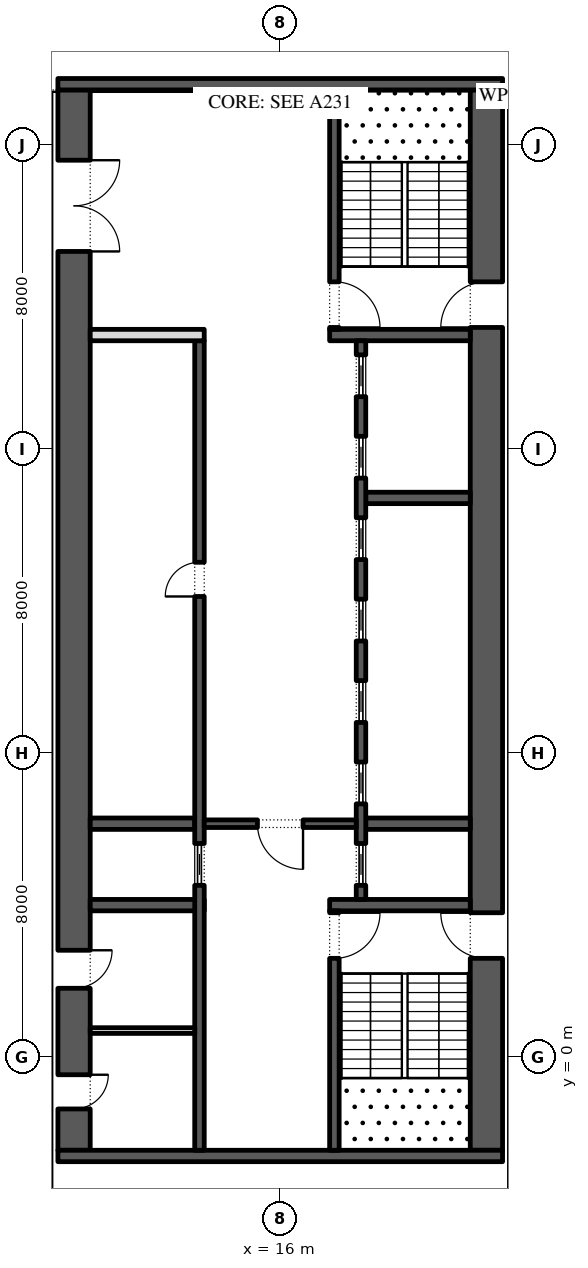
"""IFC4 building model, lengths in metres.
Left out: names, types, materials, properties, quantities, classifications, styles, units other than length and angle.
Written with IfcOpenShell. Run it as: python <this file> out.ifc"""

import sys

from ifc_helpers import new_model, si_unit, direction, frame, frame_2d, origin, place, context, subcontext, project, spatial, rectangle, extrude, element, fill, save


model = new_model("IFC4")
c1 = context("Model", 3, precision=1e-05, world=origin(), true_north=direction((0.0, 1.0)))
c2 = subcontext(c1, "Body", "Model", "MODEL_VIEW")
j1 = project(units=[si_unit("LENGTHUNIT", "METRE"), si_unit("PLANEANGLEUNIT", "RADIAN")], contexts=[c1])
p1 = place(None, origin())
s1 = spatial("IfcSite", under=j1, at=p1, CompositionType="ELEMENT")
p2 = place(p1, origin())
s2 = spatial("IfcBuilding", under=s1, at=p2, CompositionType="ELEMENT")
p3 = place(p2, frame((0.0, 0.0, 130.8)))
s3 = spatial("IfcBuildingStorey", under=s2, at=p3, CompositionType="ELEMENT", Elevation=130.8)
p4 = place(p3, frame((21.425, -2.45, 0.0), z_axis=(0.0, 0.0, 1.0), x_axis=(0.0, 1.0, 0.0)))
e1 = element("IfcWall", 1, at=p4, inside=s3, PredefinedType="SHEAR", context=c2, shape_type="SweptSolid", body=[
    extrude(rectangle(XDim=27.9, YDim=0.85, at=frame_2d((13.95, 0.0))), origin(), (0.0, 0.0, 1.0), 4.0),
])
p5 = place(p4, frame((5.05, 0.0, 0.0)))
e2 = element("IfcOpeningElement", 2, at=p5, cuts=e1, PredefinedType="OPENING", context=c2, shape_type="SweptSolid", body=[
    extrude(rectangle(XDim=1.2, YDim=2.1, at=frame_2d((0.6, 1.05))), frame((0.0, 0.435, 0.0), z_axis=(0.0, -1.0, 0.0), x_axis=(1.0, 0.0, 0.0)), (0.0, 0.0, 1.0), 0.87),
])
p6 = place(p4, frame((21.65, 0.0, 0.0)))
e3 = element("IfcOpeningElement", 3, at=p6, cuts=e1, PredefinedType="OPENING", context=c2, shape_type="SweptSolid", body=[
    extrude(rectangle(XDim=1.2, YDim=2.1, at=frame_2d((0.6, 1.05))), frame((0.0, 0.435, 0.0), z_axis=(0.0, -1.0, 0.0), x_axis=(1.0, 0.0, 0.0)), (0.0, 0.0, 1.0), 0.87),
])
p7 = place(p3, frame((10.575, -2.45, 0.0), z_axis=(0.0, 0.0, 1.0), x_axis=(0.0, 1.0, 0.0)))
e4 = element("IfcWall", 4, at=p7, inside=s3, PredefinedType="SHEAR", context=c2, shape_type="SweptSolid", body=[
    extrude(rectangle(XDim=27.9, YDim=0.85, at=frame_2d((13.95, 0.0))), origin(), (0.0, 0.0, 1.0), 4.0),
])
p8 = place(p7, frame((23.65, 0.0, 0.0)))
e5 = element("IfcOpeningElement", 5, at=p8, cuts=e4, PredefinedType="OPENING", context=c2, shape_type="SweptSolid", body=[
    extrude(rectangle(XDim=2.4, YDim=2.1, at=frame_2d((1.2, 1.05))), frame((0.0, 0.435, 0.0), z_axis=(0.0, -1.0, 0.0), x_axis=(1.0, 0.0, 0.0)), (0.0, 0.0, 1.0), 0.87),
])
p9 = place(p7, frame((1.087, 0.0, 0.0)))
e6 = element("IfcOpeningElement", 6, at=p9, cuts=e4, PredefinedType="OPENING", context=c2, shape_type="SweptSolid", body=[
    extrude(rectangle(XDim=0.9, YDim=2.1, at=frame_2d((0.45, 1.05))), frame((0.0, 0.435, 0.0), z_axis=(0.0, -1.0, 0.0), x_axis=(1.0, 0.0, 0.0)), (0.0, 0.0, 1.0), 0.87),
])
p10 = place(p7, frame((4.262, 0.0, 0.0)))
e7 = element("IfcOpeningElement", 7, at=p10, cuts=e4, PredefinedType="OPENING", context=c2, shape_type="SweptSolid", body=[
    extrude(rectangle(XDim=1.0, YDim=2.1, at=frame_2d((0.5, 1.05))), frame((0.0, 0.435, 0.0), z_axis=(0.0, -1.0, 0.0), x_axis=(1.0, 0.0, 0.0)), (0.0, 0.0, 1.0), 0.87),
])
for number, where, z_axis, x_axis in (
    (8, (10.15, -2.6, 0.0), (0.0, 0.0, 1.0), (1.0, 0.0, 0.0)),
    (9, (10.15, 25.6, 0.0), (0.0, 0.0, 1.0), (1.0, 0.0, 0.0)),
):
    element("IfcWall", number, at=place(p3, frame(where, z_axis=z_axis, x_axis=x_axis)), inside=s3, PredefinedType="SHEAR", context=c2, shape_type="SweptSolid", body=[
        extrude(rectangle(XDim=11.7, YDim=0.3, at=frame_2d((5.85, 0.0))), origin(), (0.0, 0.0, 1.0), 4.0),
    ])
p11 = place(p3, frame((17.3, 4.0, 0.0), z_axis=(0.0, 0.0, 1.0), x_axis=(1.0, 0.0, 0.0)))
e10 = element("IfcWall", 10, at=p11, inside=s3, PredefinedType="SHEAR", context=c2, shape_type="SweptSolid", body=[
    extrude(rectangle(XDim=3.7, YDim=0.3, at=frame_2d((1.85, 0.0))), origin(), (0.0, 0.0, 1.0), 4.0),
])
p12 = place(p3, frame((17.425, -2.45, 0.0), z_axis=(0.0, 0.0, 1.0), x_axis=(0.0, 1.0, 0.0)))
e11 = element("IfcWall", 11, at=p12, inside=s3, PredefinedType="SHEAR", context=c2, shape_type="SweptSolid", body=[
    extrude(rectangle(XDim=6.3, YDim=0.25, at=frame_2d((3.15, 0.0))), origin(), (0.0, 0.0, 1.0), 4.0),
])
p13 = place(p12, frame((5.05, 0.0, 0.0)))
e12 = element("IfcOpeningElement", 12, at=p13, cuts=e11, PredefinedType="OPENING", context=c2, shape_type="SweptSolid", body=[
    extrude(rectangle(XDim=1.2, YDim=2.1, at=frame_2d((0.6, 1.05))), frame((0.0, 0.135, 0.0), z_axis=(0.0, -1.0, 0.0), x_axis=(1.0, 0.0, 0.0)), (0.0, 0.0, 1.0), 0.27),
])
p14 = place(p3, frame((17.3, 19.0, 0.0), z_axis=(0.0, 0.0, 1.0), x_axis=(1.0, 0.0, 0.0)))
e13 = element("IfcWall", 13, at=p14, inside=s3, PredefinedType="SHEAR", context=c2, shape_type="SweptSolid", body=[
    extrude(rectangle(XDim=3.7, YDim=0.3, at=frame_2d((1.85, 0.0))), origin(), (0.0, 0.0, 1.0), 4.0),
])
p15 = place(p3, frame((17.425, 19.15, 0.0), z_axis=(0.0, 0.0, 1.0), x_axis=(0.0, 1.0, 0.0)))
e14 = element("IfcWall", 14, at=p15, inside=s3, PredefinedType="SHEAR", context=c2, shape_type="SweptSolid", body=[
    extrude(rectangle(XDim=6.3, YDim=0.25, at=frame_2d((3.15, 0.0))), origin(), (0.0, 0.0, 1.0), 4.0),
])
p16 = place(p15, frame((0.05, 0.0, 0.0)))
e15 = element("IfcOpeningElement", 15, at=p16, cuts=e14, PredefinedType="OPENING", context=c2, shape_type="SweptSolid", body=[
    extrude(rectangle(XDim=1.2, YDim=2.1, at=frame_2d((0.6, 1.05))), frame((0.0, 0.135, 0.0), z_axis=(0.0, -1.0, 0.0), x_axis=(1.0, 0.0, 0.0)), (0.0, 0.0, 1.0), 0.27),
])
for number, where, z_axis, x_axis in (
    (16, (18.25, 6.143, 0.0), (0.0, 0.0, 1.0), (1.0, 0.0, 0.0)),
    (17, (18.25, 14.714, 0.0), (0.0, 0.0, 1.0), (1.0, 0.0, 0.0)),
):
    element("IfcWall", number, at=place(p3, frame(where, z_axis=z_axis, x_axis=x_axis)), inside=s3, PredefinedType="SHEAR", context=c2, shape_type="SweptSolid", body=[
        extrude(rectangle(XDim=2.75, YDim=0.3, at=frame_2d((1.375, 0.0))), origin(), (0.0, 0.0, 1.0), 4.0),
    ])
p17 = place(p3, frame((18.125, 4.15, 0.0), z_axis=(0.0, 0.0, 1.0), x_axis=(0.0, 1.0, 0.0)))
e18 = element("IfcWall", 18, at=p17, inside=s3, PredefinedType="SHEAR", context=c2, shape_type="SweptSolid", body=[
    extrude(rectangle(XDim=14.7, YDim=0.25, at=frame_2d((7.35, 0.0))), origin(), (0.0, 0.0, 1.0), 4.0),
])
p18 = place(p17, frame((0.371, 0.0, 0.0)))
e19 = element("IfcOpeningElement", 19, at=p18, cuts=e18, PredefinedType="OPENING", context=c2, shape_type="SweptSolid", body=[
    extrude(rectangle(XDim=1.1, YDim=2.1, at=frame_2d((0.55, 1.05))), frame((0.0, 0.135, 0.0), z_axis=(0.0, -1.0, 0.0), x_axis=(1.0, 0.0, 0.0)), (0.0, 0.0, 1.0), 0.27),
])
p19 = place(p17, frame((2.514, 0.0, 0.0)))
e20 = element("IfcOpeningElement", 20, at=p19, cuts=e18, PredefinedType="OPENING", context=c2, shape_type="SweptSolid", body=[
    extrude(rectangle(XDim=1.1, YDim=2.1, at=frame_2d((0.55, 1.05))), frame((0.0, 0.135, 0.0), z_axis=(0.0, -1.0, 0.0), x_axis=(1.0, 0.0, 0.0)), (0.0, 0.0, 1.0), 0.27),
])
p20 = place(p17, frame((4.657, 0.0, 0.0)))
e21 = element("IfcOpeningElement", 21, at=p20, cuts=e18, PredefinedType="OPENING", context=c2, shape_type="SweptSolid", body=[
    extrude(rectangle(XDim=1.1, YDim=2.1, at=frame_2d((0.55, 1.05))), frame((0.0, 0.135, 0.0), z_axis=(0.0, -1.0, 0.0), x_axis=(1.0, 0.0, 0.0)), (0.0, 0.0, 1.0), 0.27),
])
p21 = place(p17, frame((6.8, 0.0, 0.0)))
e22 = element("IfcOpeningElement", 22, at=p21, cuts=e18, PredefinedType="OPENING", context=c2, shape_type="SweptSolid", body=[
    extrude(rectangle(XDim=1.1, YDim=2.1, at=frame_2d((0.55, 1.05))), frame((0.0, 0.135, 0.0), z_axis=(0.0, -1.0, 0.0), x_axis=(1.0, 0.0, 0.0)), (0.0, 0.0, 1.0), 0.27),
])
p22 = place(p17, frame((8.943, 0.0, 0.0)))
e23 = element("IfcOpeningElement", 23, at=p22, cuts=e18, PredefinedType="OPENING", context=c2, shape_type="SweptSolid", body=[
    extrude(rectangle(XDim=1.1, YDim=2.1, at=frame_2d((0.55, 1.05))), frame((0.0, 0.135, 0.0), z_axis=(0.0, -1.0, 0.0), x_axis=(1.0, 0.0, 0.0)), (0.0, 0.0, 1.0), 0.27),
])
p23 = place(p17, frame((11.086, 0.0, 0.0)))
e24 = element("IfcOpeningElement", 24, at=p23, cuts=e18, PredefinedType="OPENING", context=c2, shape_type="SweptSolid", body=[
    extrude(rectangle(XDim=1.1, YDim=2.1, at=frame_2d((0.55, 1.05))), frame((0.0, 0.135, 0.0), z_axis=(0.0, -1.0, 0.0), x_axis=(1.0, 0.0, 0.0)), (0.0, 0.0, 1.0), 0.27),
])
p24 = place(p17, frame((13.229, 0.0, 0.0)))
e25 = element("IfcOpeningElement", 25, at=p24, cuts=e18, PredefinedType="OPENING", context=c2, shape_type="SweptSolid", body=[
    extrude(rectangle(XDim=1.1, YDim=2.1, at=frame_2d((0.55, 1.05))), frame((0.0, 0.135, 0.0), z_axis=(0.0, -1.0, 0.0), x_axis=(1.0, 0.0, 0.0)), (0.0, 0.0, 1.0), 0.27),
])
p25 = place(p3, frame((11.0, 4.0, 0.0), z_axis=(0.0, 0.0, 1.0), x_axis=(1.0, 0.0, 0.0)))
e26 = element("IfcWall", 26, at=p25, inside=s3, PredefinedType="SHEAR", context=c2, shape_type="SweptSolid", body=[
    extrude(rectangle(XDim=3.0, YDim=0.3, at=frame_2d((1.5, 0.0))), origin(), (0.0, 0.0, 1.0), 4.0),
])
p26 = place(p3, frame((11.0, 6.143, 0.0), z_axis=(0.0, 0.0, 1.0), x_axis=(1.0, 0.0, 0.0)))
e27 = element("IfcWall", 27, at=p26, inside=s3, PredefinedType="SHEAR", context=c2, shape_type="SweptSolid", body=[
    extrude(rectangle(XDim=2.75, YDim=0.3, at=frame_2d((1.375, 0.0))), origin(), (0.0, 0.0, 1.0), 4.0),
])
p27 = place(p3, frame((13.875, -2.45, 0.0), z_axis=(0.0, 0.0, 1.0), x_axis=(0.0, 1.0, 0.0)))
e28 = element("IfcWall", 28, at=p27, inside=s3, PredefinedType="SHEAR", context=c2, shape_type="SweptSolid", body=[
    extrude(rectangle(XDim=21.3, YDim=0.25, at=frame_2d((10.65, 0.0))), origin(), (0.0, 0.0, 1.0), 4.0),
])
p28 = place(p27, frame((14.571, 0.0, 0.0)))
e29 = element("IfcOpeningElement", 29, at=p28, cuts=e28, PredefinedType="OPENING", context=c2, shape_type="SweptSolid", body=[
    extrude(rectangle(XDim=0.9, YDim=2.1, at=frame_2d((0.45, 1.05))), frame((0.0, 0.135, 0.0), z_axis=(0.0, -1.0, 0.0), x_axis=(1.0, 0.0, 0.0)), (0.0, 0.0, 1.0), 0.27),
])
p29 = place(p27, frame((6.971, 0.0, 0.0)))
e30 = element("IfcOpeningElement", 30, at=p29, cuts=e28, PredefinedType="OPENING", context=c2, shape_type="SweptSolid", body=[
    extrude(rectangle(XDim=1.1, YDim=2.1, at=frame_2d((0.55, 1.05))), frame((0.0, 0.135, 0.0), z_axis=(0.0, -1.0, 0.0), x_axis=(1.0, 0.0, 0.0)), (0.0, 0.0, 1.0), 0.27),
])
p30 = place(p3, frame((11.0, 19.0, 0.0), z_axis=(0.0, 0.0, 1.0), x_axis=(1.0, 0.0, 0.0)))
e31 = element("IfcWall", 31, at=p30, inside=s3, PredefinedType="PARTITIONING", context=c2, shape_type="SweptSolid", body=[
    extrude(rectangle(XDim=3.0, YDim=0.3, at=frame_2d((1.5, 0.0))), origin(), (0.0, 0.0, 1.0), 4.0),
])
p31 = place(p3, frame((14.0, 6.143, 0.0), z_axis=(0.0, 0.0, 1.0), x_axis=(1.0, 0.0, 0.0)))
e32 = element("IfcWall", 32, at=p31, inside=s3, PredefinedType="SHEAR", context=c2, shape_type="SweptSolid", body=[
    extrude(rectangle(XDim=4.0, YDim=0.2, at=frame_2d((2.0, 0.0))), origin(), (0.0, 0.0, 1.0), 4.0),
])
p32 = place(p31, frame((1.4, 0.0, 0.0)))
e33 = element("IfcOpeningElement", 33, at=p32, cuts=e32, PredefinedType="OPENING", context=c2, shape_type="SweptSolid", body=[
    extrude(rectangle(XDim=1.2, YDim=2.1, at=frame_2d((0.6, 1.05))), frame((0.0, 0.11, 0.0), z_axis=(0.0, -1.0, 0.0), x_axis=(1.0, 0.0, 0.0)), (0.0, 0.0, 1.0), 0.22),
])
p33 = place(p3, frame((11.0, 0.7, 0.0), z_axis=(0.0, 0.0, 1.0), x_axis=(1.0, 0.0, 0.0)))
e34 = element("IfcWall", 34, at=p33, inside=s3, PredefinedType="PARTITIONING", context=c2, shape_type="SweptSolid", body=[
    extrude(rectangle(XDim=2.75, YDim=0.15, at=frame_2d((1.375, 0.0))), origin(), (0.0, 0.0, 1.0), 4.0),
])
p34 = place(p18, origin())
e35 = element("IfcDoor", 35, at=p34, inside=s3, OperationType="SLIDING_TO_LEFT", PredefinedType="DOOR", context=c2, shape_type="SweptSolid", body=[
    extrude(rectangle(XDim=1.1, YDim=2.1, at=frame_2d((0.55, 1.05))), frame((0.0, 0.025, 0.0), z_axis=(0.0, -1.0, 0.0), x_axis=(1.0, 0.0, 0.0)), (0.0, 0.0, 1.0), 0.05),
])
fill(e19, e35)
p35 = place(p19, origin())
e36 = element("IfcDoor", 36, at=p35, inside=s3, OperationType="SLIDING_TO_LEFT", PredefinedType="DOOR", context=c2, shape_type="SweptSolid", body=[
    extrude(rectangle(XDim=1.1, YDim=2.1, at=frame_2d((0.55, 1.05))), frame((0.0, 0.025, 0.0), z_axis=(0.0, -1.0, 0.0), x_axis=(1.0, 0.0, 0.0)), (0.0, 0.0, 1.0), 0.05),
])
fill(e20, e36)
p36 = place(p20, origin())
e37 = element("IfcDoor", 37, at=p36, inside=s3, OperationType="SLIDING_TO_LEFT", PredefinedType="DOOR", context=c2, shape_type="SweptSolid", body=[
    extrude(rectangle(XDim=1.1, YDim=2.1, at=frame_2d((0.55, 1.05))), frame((0.0, 0.025, 0.0), z_axis=(0.0, -1.0, 0.0), x_axis=(1.0, 0.0, 0.0)), (0.0, 0.0, 1.0), 0.05),
])
fill(e21, e37)
p37 = place(p21, origin())
e38 = element("IfcDoor", 38, at=p37, inside=s3, OperationType="SLIDING_TO_LEFT", PredefinedType="DOOR", context=c2, shape_type="SweptSolid", body=[
    extrude(rectangle(XDim=1.1, YDim=2.1, at=frame_2d((0.55, 1.05))), frame((0.0, 0.025, 0.0), z_axis=(0.0, -1.0, 0.0), x_axis=(1.0, 0.0, 0.0)), (0.0, 0.0, 1.0), 0.05),
])
fill(e22, e38)
p38 = place(p22, origin())
e39 = element("IfcDoor", 39, at=p38, inside=s3, OperationType="SLIDING_TO_LEFT", PredefinedType="DOOR", context=c2, shape_type="SweptSolid", body=[
    extrude(rectangle(XDim=1.1, YDim=2.1, at=frame_2d((0.55, 1.05))), frame((0.0, 0.025, 0.0), z_axis=(0.0, -1.0, 0.0), x_axis=(1.0, 0.0, 0.0)), (0.0, 0.0, 1.0), 0.05),
])
fill(e23, e39)
p39 = place(p23, origin())
e40 = element("IfcDoor", 40, at=p39, inside=s3, OperationType="SLIDING_TO_LEFT", PredefinedType="DOOR", context=c2, shape_type="SweptSolid", body=[
    extrude(rectangle(XDim=1.1, YDim=2.1, at=frame_2d((0.55, 1.05))), frame((0.0, 0.025, 0.0), z_axis=(0.0, -1.0, 0.0), x_axis=(1.0, 0.0, 0.0)), (0.0, 0.0, 1.0), 0.05),
])
fill(e24, e40)
p40 = place(p24, origin())
e41 = element("IfcDoor", 41, at=p40, inside=s3, OperationType="SLIDING_TO_LEFT", PredefinedType="DOOR", context=c2, shape_type="SweptSolid", body=[
    extrude(rectangle(XDim=1.1, YDim=2.1, at=frame_2d((0.55, 1.05))), frame((0.0, 0.025, 0.0), z_axis=(0.0, -1.0, 0.0), x_axis=(1.0, 0.0, 0.0)), (0.0, 0.0, 1.0), 0.05),
])
fill(e25, e41)
p41 = place(p28, origin())
e42 = element("IfcDoor", 42, at=p41, inside=s3, OperationType="SINGLE_SWING_RIGHT", PredefinedType="DOOR", context=c2, shape_type="SweptSolid", body=[
    extrude(rectangle(XDim=0.9, YDim=2.1, at=frame_2d((0.45, 1.05))), frame((0.0, 0.125, 0.0), z_axis=(0.0, -1.0, 0.0), x_axis=(1.0, 0.0, 0.0)), (0.0, 0.0, 1.0), 0.05),
])
fill(e29, e42)
p42 = place(p29, origin())
e43 = element("IfcDoor", 43, at=p42, inside=s3, OperationType="SLIDING_TO_LEFT", PredefinedType="DOOR", context=c2, shape_type="SweptSolid", body=[
    extrude(rectangle(XDim=1.1, YDim=2.1, at=frame_2d((0.55, 1.05))), frame((0.0, 0.025, 0.0), z_axis=(0.0, -1.0, 0.0), x_axis=(1.0, 0.0, 0.0)), (0.0, 0.0, 1.0), 0.05),
])
fill(e30, e43)
p43 = place(p32, frame((1.2, 0.0, 0.0), z_axis=(0.0, 0.0, 1.0), x_axis=(-1.0, 0.0, 0.0)))
e44 = element("IfcDoor", 44, at=p43, inside=s3, OperationType="SINGLE_SWING_RIGHT", PredefinedType="DOOR", context=c2, shape_type="SweptSolid", body=[
    extrude(rectangle(XDim=1.2, YDim=2.1, at=frame_2d((0.6, 1.05))), frame((0.0, 0.025, 0.0), z_axis=(0.0, -1.0, 0.0), x_axis=(1.0, 0.0, 0.0)), (0.0, 0.0, 1.0), 0.05),
])
fill(e33, e44)
p44 = place(p8, frame((2.4, 0.0, 0.0), z_axis=(0.0, 0.0, 1.0), x_axis=(-1.0, 0.0, 0.0)))
e45 = element("IfcDoor", 45, at=p44, inside=s3, OperationType="DOUBLE_DOOR_SINGLE_SWING", PredefinedType="DOOR", context=c2, shape_type="SweptSolid", body=[
    extrude(rectangle(XDim=2.4, YDim=2.1, at=frame_2d((1.2, 1.05))), frame((0.0, 0.025, 0.0), z_axis=(0.0, -1.0, 0.0), x_axis=(1.0, 0.0, 0.0)), (0.0, 0.0, 1.0), 0.05),
])
fill(e5, e45)
p45 = place(p13, frame((1.2, 0.0, 0.0), z_axis=(0.0, 0.0, 1.0), x_axis=(-1.0, 0.0, 0.0)))
e46 = element("IfcDoor", 46, at=p45, inside=s3, OperationType="SINGLE_SWING_RIGHT", PredefinedType="DOOR", context=c2, shape_type="SweptSolid", body=[
    extrude(rectangle(XDim=1.2, YDim=2.1, at=frame_2d((0.6, 1.05))), frame((0.0, 0.025, 0.0), z_axis=(0.0, -1.0, 0.0), x_axis=(1.0, 0.0, 0.0)), (0.0, 0.0, 1.0), 0.05),
])
fill(e12, e46)
p46 = place(p5, origin())
e47 = element("IfcDoor", 47, at=p46, inside=s3, OperationType="SINGLE_SWING_LEFT", PredefinedType="DOOR", context=c2, shape_type="SweptSolid", body=[
    extrude(rectangle(XDim=1.2, YDim=2.1, at=frame_2d((0.6, 1.05))), frame((0.0, 0.025, 0.0), z_axis=(0.0, -1.0, 0.0), x_axis=(1.0, 0.0, 0.0)), (0.0, 0.0, 1.0), 0.05),
])
fill(e2, e47)
p47 = place(p16, frame((1.2, 0.0, 0.0), z_axis=(0.0, 0.0, 1.0), x_axis=(-1.0, 0.0, 0.0)))
e48 = element("IfcDoor", 48, at=p47, inside=s3, OperationType="SINGLE_SWING_LEFT", PredefinedType="DOOR", context=c2, shape_type="SweptSolid", body=[
    extrude(rectangle(XDim=1.2, YDim=2.1, at=frame_2d((0.6, 1.05))), frame((0.0, 0.025, 0.0), z_axis=(0.0, -1.0, 0.0), x_axis=(1.0, 0.0, 0.0)), (0.0, 0.0, 1.0), 0.05),
])
fill(e15, e48)
p48 = place(p6, origin())
e49 = element("IfcDoor", 49, at=p48, inside=s3, OperationType="SINGLE_SWING_RIGHT", PredefinedType="DOOR", context=c2, shape_type="SweptSolid", body=[
    extrude(rectangle(XDim=1.2, YDim=2.1, at=frame_2d((0.6, 1.05))), frame((0.0, 0.025, 0.0), z_axis=(0.0, -1.0, 0.0), x_axis=(1.0, 0.0, 0.0)), (0.0, 0.0, 1.0), 0.05),
])
fill(e3, e49)
p49 = place(p9, frame((0.9, -0.8, 0.0), z_axis=(0.0, 0.0, 1.0), x_axis=(-1.0, 0.0, 0.0)))
e50 = element("IfcDoor", 50, at=p49, inside=s3, OperationType="SINGLE_SWING_RIGHT", PredefinedType="DOOR", context=c2, shape_type="SweptSolid", body=[
    extrude(rectangle(XDim=0.9, YDim=2.1, at=frame_2d((0.45, 1.05))), frame((0.0, -0.375, 0.0), z_axis=(0.0, -1.0, 0.0), x_axis=(1.0, 0.0, 0.0)), (0.0, 0.0, 1.0), 0.05),
])
fill(e6, e50)
p50 = place(p10, frame((1.0, -0.8, 0.0), z_axis=(0.0, 0.0, 1.0), x_axis=(-1.0, 0.0, 0.0)))
e51 = element("IfcDoor", 51, at=p50, inside=s3, OperationType="SINGLE_SWING_RIGHT", PredefinedType="DOOR", context=c2, shape_type="SweptSolid", body=[
    extrude(rectangle(XDim=1.0, YDim=2.1, at=frame_2d((0.5, 1.05))), frame((0.0, -0.375, 0.0), z_axis=(0.0, -1.0, 0.0), x_axis=(1.0, 0.0, 0.0)), (0.0, 0.0, 1.0), 0.05),
])
fill(e7, e51)
save(model, sys.argv[1])
